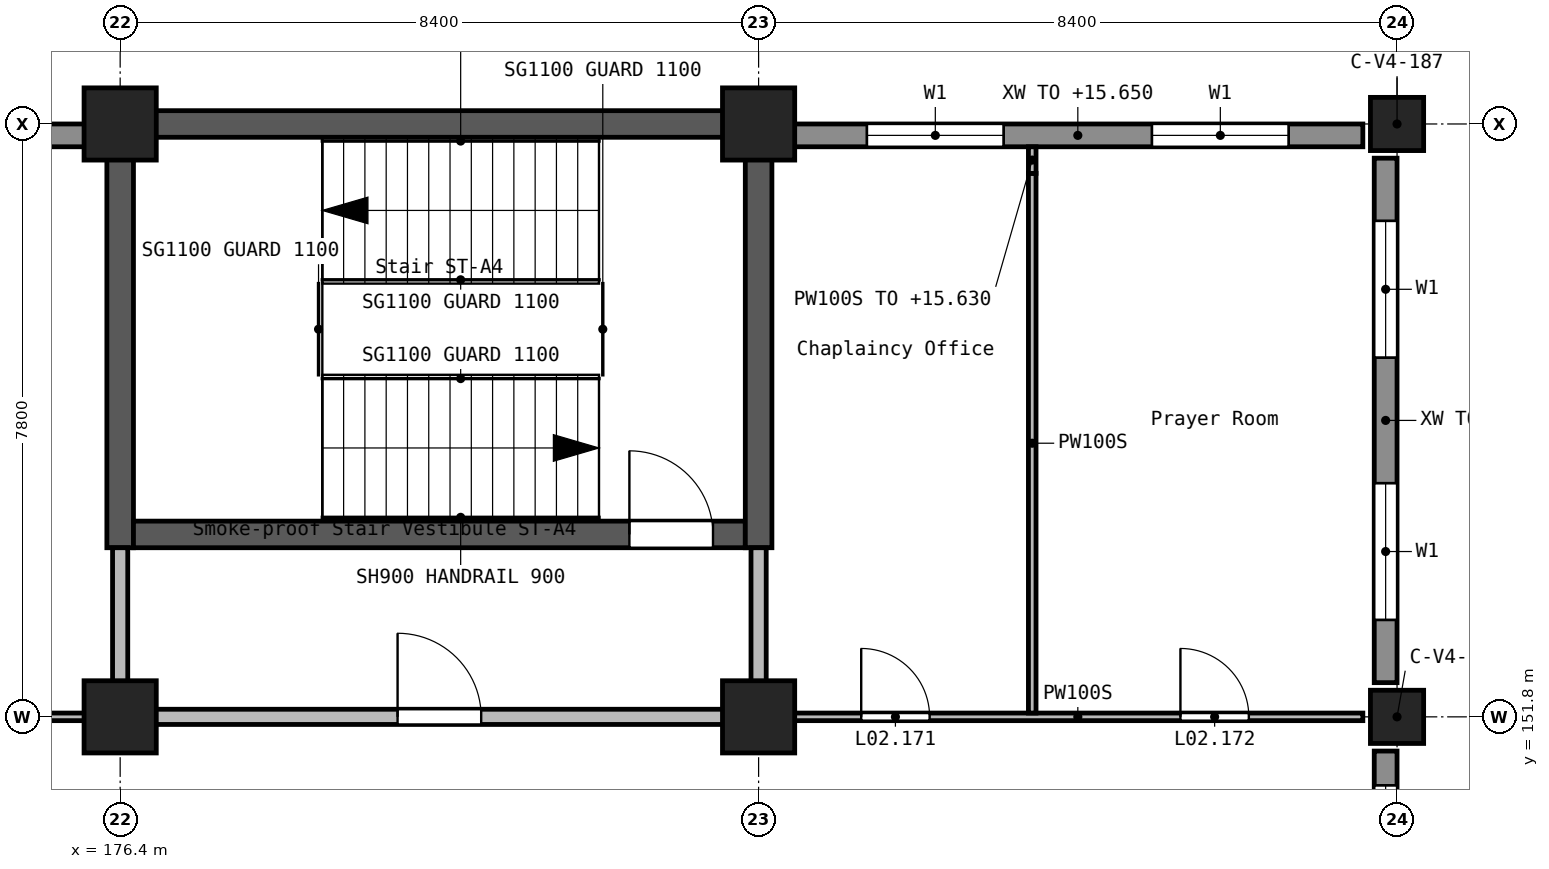
"""IFC4 building model, lengths in metres.
Left out: names, types, materials, properties, quantities, classifications, styles, units other than length and angle.
Written with IfcOpenShell. Run it as: python <this file> out.ifc"""

import sys

from ifc_helpers import new_model, si_unit, direction, frame, frame_2d, origin, origin_2d, place, context, subcontext, project, spatial, rectangle, extrude, element, fill, save


model = new_model("IFC4")
c1 = context("Model", 3, precision=1e-05, world=origin(), true_north=direction((0.0, 1.0)))
c2 = subcontext(c1, "Body", "Model", "MODEL_VIEW")
j1 = project(units=[si_unit("LENGTHUNIT", "METRE"), si_unit("PLANEANGLEUNIT", "RADIAN")], contexts=[c1])
p1 = place(None, origin())
s1 = spatial("IfcSite", under=j1, at=p1, CompositionType="ELEMENT")
p2 = place(p1, origin())
s2 = spatial("IfcBuilding", under=s1, at=p2, CompositionType="ELEMENT")
p3 = place(p2, frame((0.0, 0.0, 12.6)))
s3 = spatial("IfcBuildingStorey", under=s2, at=p3, CompositionType="ELEMENT", Elevation=12.6)
for number, where, z_axis, x_axis in (
    (1, (176.4, 151.8, 0.0), (0.0, 0.0, 1.0), (1.0, 0.0, 0.0)),
    (2, (176.4, 159.6, 0.0), (0.0, 0.0, 1.0), (1.0, 0.0, 0.0)),
    (3, (184.8, 151.8, 0.0), (0.0, 0.0, 1.0), (1.0, 0.0, 0.0)),
    (4, (184.8, 159.6, 0.0), (0.0, 0.0, 1.0), (1.0, 0.0, 0.0)),
):
    element("IfcColumn", number, at=place(p3, frame(where, z_axis=z_axis, x_axis=x_axis)), inside=s3, PredefinedType="COLUMN", context=c2, shape_type="SweptSolid", body=[
        extrude(rectangle(XDim=0.95, YDim=0.95, at=origin_2d()), origin(), (0.0, 0.0, 1.0), 4.2),
    ])
for number, where, z_axis, x_axis in (
    (5, (193.2, 151.8, 0.0), (0.0, 0.0, 1.0), (1.0, 0.0, 0.0)),
    (6, (193.2, 159.6, 0.0), (0.0, 0.0, 1.0), (1.0, 0.0, 0.0)),
):
    element("IfcColumn", number, at=place(p3, frame(where, z_axis=z_axis, x_axis=x_axis)), inside=s3, PredefinedType="COLUMN", context=c2, shape_type="SweptSolid", body=[
        extrude(rectangle(XDim=0.7, YDim=0.7, at=origin_2d()), origin(), (0.0, 0.0, 1.0), 4.2),
    ])
p4 = place(p3, frame((176.225, 159.6, 0.0), z_axis=(0.0, 0.0, 1.0), x_axis=(1.0, 0.0, 0.0)))
e7 = element("IfcWall", 7, at=p4, inside=s3, PredefinedType="SHEAR", context=c2, shape_type="SweptSolid", body=[
    extrude(rectangle(XDim=8.4, YDim=0.35, at=frame_2d((4.2, 0.0))), origin(), (0.0, 0.0, 1.0), 4.2),
])
p5 = place(p3, frame((176.4, 154.025, 0.0), z_axis=(0.0, 0.0, 1.0), x_axis=(0.0, 1.0, 0.0)))
e8 = element("IfcWall", 8, at=p5, inside=s3, PredefinedType="SHEAR", context=c2, shape_type="SweptSolid", body=[
    extrude(rectangle(XDim=5.4, YDim=0.35, at=frame_2d((2.7, 0.0))), origin(), (0.0, 0.0, 1.0), 4.2),
])
p6 = place(p3, frame((176.575, 154.2, 0.0), z_axis=(0.0, 0.0, 1.0), x_axis=(1.0, 0.0, 0.0)))
e9 = element("IfcWall", 9, at=p6, inside=s3, PredefinedType="SHEAR", context=c2, shape_type="SweptSolid", body=[
    extrude(rectangle(XDim=8.05, YDim=0.35, at=frame_2d((4.025, 0.0))), origin(), (0.0, 0.0, 1.0), 4.2),
])
p7 = place(p6, frame((6.525, 0.0, 0.0)))
e10 = element("IfcOpeningElement", 10, at=p7, cuts=e9, PredefinedType="OPENING", context=c2, shape_type="SweptSolid", body=[
    extrude(rectangle(XDim=1.1, YDim=2.1, at=frame_2d((0.55, 1.05))), frame((0.0, 0.185, 0.0), z_axis=(0.0, -1.0, 0.0), x_axis=(1.0, 0.0, 0.0)), (0.0, 0.0, 1.0), 0.37),
])
p8 = place(p3, frame((184.8, 154.025, 0.0), z_axis=(0.0, 0.0, 1.0), x_axis=(0.0, 1.0, 0.0)))
e11 = element("IfcWall", 11, at=p8, inside=s3, PredefinedType="SHEAR", context=c2, shape_type="SweptSolid", body=[
    extrude(rectangle(XDim=5.75, YDim=0.35, at=frame_2d((2.875, 0.0))), origin(), (0.0, 0.0, 1.0), 4.2),
])
p9 = place(p3, frame((193.05, 148.65, 0.0), z_axis=(0.0, 0.0, 1.0), x_axis=(0.0, 1.0, 0.0)))
e12 = element("IfcWall", 12, at=p9, inside=s3, PredefinedType="STANDARD", context=c2, shape_type="SweptSolid", body=[
    extrude(rectangle(XDim=2.7, YDim=0.3, at=frame_2d((1.35, 0.0))), origin(), (0.0, 0.0, 1.0), 3.05),
])
p10 = place(p9, frame((0.45, 0.0, 0.9)))
e13 = element("IfcOpeningElement", 13, at=p10, cuts=e12, PredefinedType="OPENING", context=c2, shape_type="SweptSolid", body=[
    extrude(rectangle(XDim=1.8, YDim=1.5, at=frame_2d((0.9, 0.75))), frame((0.0, 0.16, 0.0), z_axis=(0.0, -1.0, 0.0), x_axis=(1.0, 0.0, 0.0)), (0.0, 0.0, 1.0), 0.32),
])
p11 = place(p3, frame((193.05, 152.25, 0.0), z_axis=(0.0, 0.0, 1.0), x_axis=(0.0, 1.0, 0.0)))
e14 = element("IfcWall", 14, at=p11, inside=s3, PredefinedType="STANDARD", context=c2, shape_type="SweptSolid", body=[
    extrude(rectangle(XDim=6.9, YDim=0.3, at=frame_2d((3.45, 0.0))), origin(), (0.0, 0.0, 1.0), 3.05),
])
p12 = place(p11, frame((0.825, 0.0, 0.9)))
e15 = element("IfcOpeningElement", 15, at=p12, cuts=e14, PredefinedType="OPENING", context=c2, shape_type="SweptSolid", body=[
    extrude(rectangle(XDim=1.8, YDim=1.5, at=frame_2d((0.9, 0.75))), frame((0.0, 0.16, 0.0), z_axis=(0.0, -1.0, 0.0), x_axis=(1.0, 0.0, 0.0)), (0.0, 0.0, 1.0), 0.32),
])
p13 = place(p11, frame((4.275, 0.0, 0.9)))
e16 = element("IfcOpeningElement", 16, at=p13, cuts=e14, PredefinedType="OPENING", context=c2, shape_type="SweptSolid", body=[
    extrude(rectangle(XDim=1.8, YDim=1.5, at=frame_2d((0.9, 0.75))), frame((0.0, 0.16, 0.0), z_axis=(0.0, -1.0, 0.0), x_axis=(1.0, 0.0, 0.0)), (0.0, 0.0, 1.0), 0.32),
])
p14 = place(p3, frame((192.75, 159.45, 0.0), z_axis=(0.0, 0.0, 1.0), x_axis=(-1.0, 0.0, 0.0)))
e17 = element("IfcWall", 17, at=p14, inside=s3, PredefinedType="STANDARD", context=c2, shape_type="SweptSolid", body=[
    extrude(rectangle(XDim=7.5, YDim=0.3, at=frame_2d((3.75, 0.0))), origin(), (0.0, 0.0, 1.0), 3.05),
])
p15 = place(p14, frame((0.975, 0.0, 0.9)))
e18 = element("IfcOpeningElement", 18, at=p15, cuts=e17, PredefinedType="OPENING", context=c2, shape_type="SweptSolid", body=[
    extrude(rectangle(XDim=1.8, YDim=1.5, at=frame_2d((0.9, 0.75))), frame((0.0, 0.16, 0.0), z_axis=(0.0, -1.0, 0.0), x_axis=(1.0, 0.0, 0.0)), (0.0, 0.0, 1.0), 0.32),
])
p16 = place(p14, frame((4.725, 0.0, 0.9)))
e19 = element("IfcOpeningElement", 19, at=p16, cuts=e17, PredefinedType="OPENING", context=c2, shape_type="SweptSolid", body=[
    extrude(rectangle(XDim=1.8, YDim=1.5, at=frame_2d((0.9, 0.75))), frame((0.0, 0.16, 0.0), z_axis=(0.0, -1.0, 0.0), x_axis=(1.0, 0.0, 0.0)), (0.0, 0.0, 1.0), 0.32),
])
p17 = place(p3, frame((175.95, 159.45, 0.0), z_axis=(0.0, 0.0, 1.0), x_axis=(-1.0, 0.0, 0.0)))
e20 = element("IfcWall", 20, at=p17, inside=s3, PredefinedType="STANDARD", context=c2, shape_type="SweptSolid", body=[
    extrude(rectangle(XDim=7.5, YDim=0.3, at=frame_2d((3.75, 0.0))), origin(), (0.0, 0.0, 1.0), 3.05),
])
p18 = place(p17, frame((0.975, 0.0, 0.9)))
e21 = element("IfcOpeningElement", 21, at=p18, cuts=e20, PredefinedType="OPENING", context=c2, shape_type="SweptSolid", body=[
    extrude(rectangle(XDim=1.8, YDim=1.5, at=frame_2d((0.9, 0.75))), frame((0.0, 0.16, 0.0), z_axis=(0.0, -1.0, 0.0), x_axis=(1.0, 0.0, 0.0)), (0.0, 0.0, 1.0), 0.32),
])
p19 = place(p17, frame((5.125, 0.0, 0.9)))
e22 = element("IfcOpeningElement", 22, at=p19, cuts=e20, PredefinedType="OPENING", context=c2, shape_type="SweptSolid", body=[
    extrude(rectangle(XDim=1.8, YDim=1.5, at=frame_2d((0.9, 0.75))), frame((0.0, 0.16, 0.0), z_axis=(0.0, -1.0, 0.0), x_axis=(1.0, 0.0, 0.0)), (0.0, 0.0, 1.0), 0.32),
])
p20 = place(p3, frame((176.85, 151.8, 0.0), z_axis=(0.0, 0.0, 1.0), x_axis=(1.0, 0.0, 0.0)))
e23 = element("IfcWall", 23, at=p20, inside=s3, PredefinedType="SOLIDWALL", context=c2, shape_type="SweptSolid", body=[
    extrude(rectangle(XDim=7.5, YDim=0.2, at=frame_2d((3.75, 0.0))), origin(), (0.0, 0.0, 1.0), 3.85),
])
p21 = place(p20, frame((3.2, 0.0, 0.0)))
e24 = element("IfcOpeningElement", 24, at=p21, cuts=e23, PredefinedType="OPENING", context=c2, shape_type="SweptSolid", body=[
    extrude(rectangle(XDim=1.1, YDim=2.1, at=frame_2d((0.55, 1.05))), frame((0.0, 0.11, 0.0), z_axis=(0.0, -1.0, 0.0), x_axis=(1.0, 0.0, 0.0)), (0.0, 0.0, 1.0), 0.22),
])
p22 = place(p3, frame((176.4, 152.25, 0.0), z_axis=(0.0, 0.0, 1.0), x_axis=(0.0, 1.0, 0.0)))
e25 = element("IfcWall", 25, at=p22, inside=s3, PredefinedType="SOLIDWALL", context=c2, shape_type="SweptSolid", body=[
    extrude(rectangle(XDim=1.775, YDim=0.2, at=frame_2d((0.887, 0.0))), origin(), (0.0, 0.0, 1.0), 3.85),
])
p23 = place(p3, frame((184.8, 152.25, 0.0), z_axis=(0.0, 0.0, 1.0), x_axis=(0.0, 1.0, 0.0)))
e26 = element("IfcWall", 26, at=p23, inside=s3, PredefinedType="SOLIDWALL", context=c2, shape_type="SweptSolid", body=[
    extrude(rectangle(XDim=1.775, YDim=0.2, at=frame_2d((0.887, 0.0))), origin(), (0.0, 0.0, 1.0), 3.03),
])
p24 = place(p3, frame((175.95, 151.8, 0.0), z_axis=(0.0, 0.0, 1.0), x_axis=(-1.0, 0.0, 0.0)))
e27 = element("IfcWall", 27, at=p24, inside=s3, PredefinedType="PARTITIONING", context=c2, shape_type="SweptSolid", body=[
    extrude(rectangle(XDim=7.5, YDim=0.1, at=frame_2d((3.75, 0.0))), origin(), (0.0, 0.0, 1.0), 3.85),
])
p25 = place(p24, frame((6.5, 0.0, 0.0)))
e28 = element("IfcOpeningElement", 28, at=p25, cuts=e27, PredefinedType="OPENING", context=c2, shape_type="SweptSolid", body=[
    extrude(rectangle(XDim=0.9, YDim=2.1, at=frame_2d((0.45, 1.05))), frame((0.0, 0.06, 0.0), z_axis=(0.0, -1.0, 0.0), x_axis=(1.0, 0.0, 0.0)), (0.0, 0.0, 1.0), 0.12),
])
p26 = place(p24, frame((1.35, 0.0, 0.0)))
e29 = element("IfcOpeningElement", 29, at=p26, cuts=e27, PredefinedType="OPENING", context=c2, shape_type="SweptSolid", body=[
    extrude(rectangle(XDim=1.8, YDim=2.1, at=frame_2d((0.9, 1.05))), frame((0.0, 0.06, 0.0), z_axis=(0.0, -1.0, 0.0), x_axis=(1.0, 0.0, 0.0)), (0.0, 0.0, 1.0), 0.12),
])
p27 = place(p3, frame((185.25, 151.8, 0.0), z_axis=(0.0, 0.0, 1.0), x_axis=(1.0, 0.0, 0.0)))
e30 = element("IfcWall", 30, at=p27, inside=s3, PredefinedType="PARTITIONING", context=c2, shape_type="SweptSolid", body=[
    extrude(rectangle(XDim=7.5, YDim=0.1, at=frame_2d((3.75, 0.0))), origin(), (0.0, 0.0, 1.0), 3.85),
])
p28 = place(p27, frame((0.9, 0.0, 0.0)))
e31 = element("IfcOpeningElement", 31, at=p28, cuts=e30, PredefinedType="OPENING", context=c2, shape_type="SweptSolid", body=[
    extrude(rectangle(XDim=0.9, YDim=2.1, at=frame_2d((0.45, 1.05))), frame((0.0, 0.06, 0.0), z_axis=(0.0, -1.0, 0.0), x_axis=(1.0, 0.0, 0.0)), (0.0, 0.0, 1.0), 0.12),
])
p29 = place(p27, frame((5.1, 0.0, 0.0)))
e32 = element("IfcOpeningElement", 32, at=p29, cuts=e30, PredefinedType="OPENING", context=c2, shape_type="SweptSolid", body=[
    extrude(rectangle(XDim=0.9, YDim=2.1, at=frame_2d((0.45, 1.05))), frame((0.0, 0.06, 0.0), z_axis=(0.0, -1.0, 0.0), x_axis=(1.0, 0.0, 0.0)), (0.0, 0.0, 1.0), 0.12),
])
p30 = place(p3, frame((188.4, 151.85, 0.0), z_axis=(0.0, 0.0, 1.0), x_axis=(0.0, 1.0, 0.0)))
e33 = element("IfcWall", 33, at=p30, inside=s3, PredefinedType="PARTITIONING", context=c2, shape_type="SweptSolid", body=[
    extrude(rectangle(XDim=7.1, YDim=0.1, at=frame_2d((3.55, 0.0))), origin(), (0.0, 0.0, 1.0), 3.85),
])
p31 = place(p3, frame((188.4, 158.95, 0.0), z_axis=(0.0, 0.0, 1.0), x_axis=(0.0, 1.0, 0.0)))
e34 = element("IfcWall", 34, at=p31, inside=s3, PredefinedType="PARTITIONING", context=c2, shape_type="SweptSolid", body=[
    extrude(rectangle(XDim=0.35, YDim=0.1, at=frame_2d((0.175, 0.0))), origin(), (0.0, 0.0, 1.0), 3.03),
])
p32 = place(p10, origin())
e35 = element("IfcWindow", 35, at=p32, inside=s3, PartitioningType="SINGLE_PANEL", PredefinedType="WINDOW", context=c2, shape_type="SweptSolid", body=[
    extrude(rectangle(XDim=1.8, YDim=1.5, at=frame_2d((0.9, 0.75))), frame((0.0, 0.03, 0.0), z_axis=(0.0, -1.0, 0.0), x_axis=(1.0, 0.0, 0.0)), (0.0, 0.0, 1.0), 0.06),
])
fill(e13, e35)
p33 = place(p12, origin())
e36 = element("IfcWindow", 36, at=p33, inside=s3, PartitioningType="SINGLE_PANEL", PredefinedType="WINDOW", context=c2, shape_type="SweptSolid", body=[
    extrude(rectangle(XDim=1.8, YDim=1.5, at=frame_2d((0.9, 0.75))), frame((0.0, 0.03, 0.0), z_axis=(0.0, -1.0, 0.0), x_axis=(1.0, 0.0, 0.0)), (0.0, 0.0, 1.0), 0.06),
])
fill(e15, e36)
p34 = place(p13, origin())
e37 = element("IfcWindow", 37, at=p34, inside=s3, PartitioningType="SINGLE_PANEL", PredefinedType="WINDOW", context=c2, shape_type="SweptSolid", body=[
    extrude(rectangle(XDim=1.8, YDim=1.5, at=frame_2d((0.9, 0.75))), frame((0.0, 0.03, 0.0), z_axis=(0.0, -1.0, 0.0), x_axis=(1.0, 0.0, 0.0)), (0.0, 0.0, 1.0), 0.06),
])
fill(e16, e37)
p35 = place(p15, origin())
e38 = element("IfcWindow", 38, at=p35, inside=s3, PartitioningType="SINGLE_PANEL", PredefinedType="WINDOW", context=c2, shape_type="SweptSolid", body=[
    extrude(rectangle(XDim=1.8, YDim=1.5, at=frame_2d((0.9, 0.75))), frame((0.0, 0.03, 0.0), z_axis=(0.0, -1.0, 0.0), x_axis=(1.0, 0.0, 0.0)), (0.0, 0.0, 1.0), 0.06),
])
fill(e18, e38)
p36 = place(p16, origin())
e39 = element("IfcWindow", 39, at=p36, inside=s3, PartitioningType="SINGLE_PANEL", PredefinedType="WINDOW", context=c2, shape_type="SweptSolid", body=[
    extrude(rectangle(XDim=1.8, YDim=1.5, at=frame_2d((0.9, 0.75))), frame((0.0, 0.03, 0.0), z_axis=(0.0, -1.0, 0.0), x_axis=(1.0, 0.0, 0.0)), (0.0, 0.0, 1.0), 0.06),
])
fill(e19, e39)
p37 = place(p7, origin())
e40 = element("IfcDoor", 40, at=p37, inside=s3, OperationType="SINGLE_SWING_RIGHT", PredefinedType="DOOR", context=c2, shape_type="SweptSolid", body=[
    extrude(rectangle(XDim=1.1, YDim=2.1, at=frame_2d((0.55, 1.05))), frame((0.0, 0.025, 0.0), z_axis=(0.0, -1.0, 0.0), x_axis=(1.0, 0.0, 0.0)), (0.0, 0.0, 1.0), 0.05),
])
fill(e10, e40)
p38 = place(p21, origin())
e41 = element("IfcDoor", 41, at=p38, inside=s3, OperationType="SINGLE_SWING_RIGHT", PredefinedType="DOOR", context=c2, shape_type="SweptSolid", body=[
    extrude(rectangle(XDim=1.1, YDim=2.1, at=frame_2d((0.55, 1.05))), frame((0.0, 0.025, 0.0), z_axis=(0.0, -1.0, 0.0), x_axis=(1.0, 0.0, 0.0)), (0.0, 0.0, 1.0), 0.05),
])
fill(e24, e41)
p39 = place(p28, origin())
e42 = element("IfcDoor", 42, at=p39, inside=s3, OperationType="SINGLE_SWING_LEFT", PredefinedType="DOOR", context=c2, shape_type="SweptSolid", body=[
    extrude(rectangle(XDim=0.9, YDim=2.1, at=frame_2d((0.45, 1.05))), frame((0.0, 0.025, 0.0), z_axis=(0.0, -1.0, 0.0), x_axis=(1.0, 0.0, 0.0)), (0.0, 0.0, 1.0), 0.05),
])
fill(e31, e42)
p40 = place(p29, origin())
e43 = element("IfcDoor", 43, at=p40, inside=s3, OperationType="SINGLE_SWING_RIGHT", PredefinedType="DOOR", context=c2, shape_type="SweptSolid", body=[
    extrude(rectangle(XDim=0.9, YDim=2.1, at=frame_2d((0.45, 1.05))), frame((0.0, 0.025, 0.0), z_axis=(0.0, -1.0, 0.0), x_axis=(1.0, 0.0, 0.0)), (0.0, 0.0, 1.0), 0.05),
])
fill(e32, e43)
save(model, sys.argv[1])
